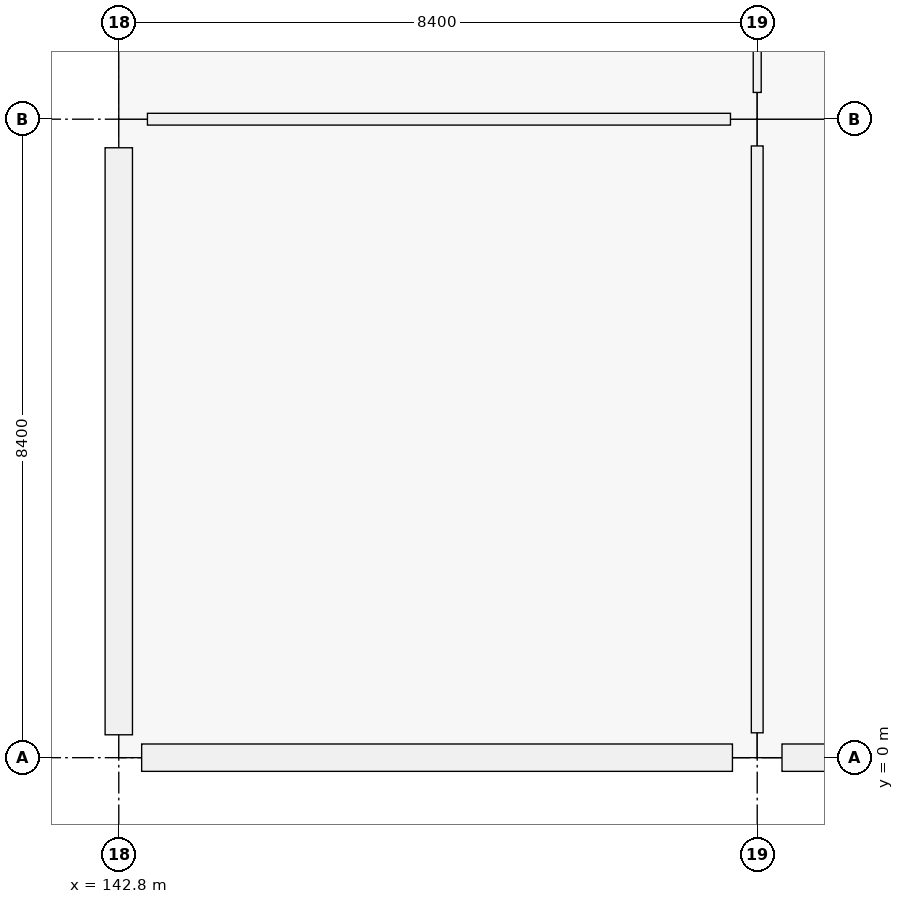
"""IFC4 building model, lengths in metres.
Left out: names, types, materials, properties, quantities, classifications, styles, units other than length and angle.
Written with IfcOpenShell. Run it as: python <this file> out.ifc"""

import sys

from ifc_helpers import new_model, si_unit, direction, frame, frame_2d, origin, origin_2d, place, context, subcontext, project, spatial, rectangle, extrude, element, fill, save


model = new_model("IFC4")
c1 = context("Model", 3, precision=1e-05, world=origin(), true_north=direction((0.0, 1.0)))
c2 = subcontext(c1, "Body", "Model", "MODEL_VIEW")
j1 = project(units=[si_unit("LENGTHUNIT", "METRE"), si_unit("PLANEANGLEUNIT", "RADIAN")], contexts=[c1])
p1 = place(None, origin())
s1 = spatial("IfcSite", under=j1, at=p1, CompositionType="ELEMENT")
p2 = place(p1, origin())
s2 = spatial("IfcBuilding", under=s1, at=p2, CompositionType="ELEMENT")
p3 = place(p2, origin())
s3 = spatial("IfcBuildingStorey", under=s2, at=p3, CompositionType="ELEMENT", Elevation=0.0)
p4 = place(p3, frame((142.8, 0.0, 0.0), z_axis=(0.0, 0.0, 1.0), x_axis=(1.0, 0.0, 0.0)))
e1 = element("IfcColumn", 1, at=p4, inside=s3, PredefinedType="COLUMN", context=c2, shape_type="SweptSolid", body=[
    extrude(rectangle(XDim=0.6, YDim=0.6, at=origin_2d()), origin(), (0.0, 0.0, 1.0), 5.76),
])
p5 = place(p3, frame((142.8, 8.4, 0.0), z_axis=(0.0, 0.0, 1.0), x_axis=(1.0, 0.0, 0.0)))
e2 = element("IfcColumn", 2, at=p5, inside=s3, PredefinedType="COLUMN", context=c2, shape_type="SweptSolid", body=[
    extrude(rectangle(XDim=0.75, YDim=0.75, at=origin_2d()), origin(), (0.0, 0.0, 1.0), 5.76),
])
p6 = place(p3, frame((151.2, 0.0, 0.0), z_axis=(0.0, 0.0, 1.0), x_axis=(1.0, 0.0, 0.0)))
e3 = element("IfcColumn", 3, at=p6, inside=s3, PredefinedType="COLUMN", context=c2, shape_type="SweptSolid", body=[
    extrude(rectangle(XDim=0.65, YDim=0.65, at=origin_2d()), origin(), (0.0, 0.0, 1.0), 5.76),
])
p7 = place(p3, frame((151.2, 8.4, 0.0), z_axis=(0.0, 0.0, 1.0), x_axis=(1.0, 0.0, 0.0)))
e4 = element("IfcColumn", 4, at=p7, inside=s3, PredefinedType="COLUMN", context=c2, shape_type="SweptSolid", body=[
    extrude(rectangle(XDim=0.7, YDim=0.7, at=origin_2d()), origin(), (0.0, 0.0, 1.0), 5.76),
])
p8 = place(p3, frame((150.874, 0.0, 0.0), z_axis=(0.0, 0.0, 1.0), x_axis=(-1.0, 0.0, 0.0)))
e5 = element("IfcWall", 5, at=p8, inside=s3, PredefinedType="SOLIDWALL", context=c2, shape_type="SweptSolid", body=[
    extrude(rectangle(XDim=7.773, YDim=0.36, at=frame_2d((3.886, 0.0))), origin(), (0.0, 0.0, 1.0), 4.7),
])
p9 = place(p8, frame((2.712, 0.0, 0.9)))
e6 = element("IfcOpeningElement", 6, at=p9, cuts=e5, PredefinedType="OPENING", context=c2, shape_type="SweptSolid", body=[
    extrude(rectangle(XDim=2.35, YDim=1.6, at=frame_2d((1.175, 0.8))), frame((0.0, 0.18, 0.0), z_axis=(0.0, -1.0, 0.0), x_axis=(1.0, 0.0, 0.0)), (0.0, 0.0, 1.0), 0.36),
])
p10 = place(p3, frame((142.8, 0.301, 0.0), z_axis=(0.0, 0.0, 1.0), x_axis=(0.0, 1.0, 0.0)))
e7 = element("IfcWall", 7, at=p10, inside=s3, PredefinedType="SOLIDWALL", context=c2, shape_type="SweptSolid", body=[
    extrude(rectangle(XDim=7.723, YDim=0.36, at=frame_2d((3.861, 0.0))), origin(), (0.0, 0.0, 1.0), 4.7),
])
p11 = place(p10, frame((2.486, 0.0, 0.9)))
e8 = element("IfcOpeningElement", 8, at=p11, cuts=e7, PredefinedType="OPENING", context=c2, shape_type="SweptSolid", body=[
    extrude(rectangle(XDim=2.75, YDim=1.6, at=frame_2d((1.375, 0.8))), frame((0.0, 0.18, 0.0), z_axis=(0.0, -1.0, 0.0), x_axis=(1.0, 0.0, 0.0)), (0.0, 0.0, 1.0), 0.36),
])
p12 = place(p3, frame((159.299, 0.0, 0.0), z_axis=(0.0, 0.0, 1.0), x_axis=(-1.0, 0.0, 0.0)))
e9 = element("IfcWall", 9, at=p12, inside=s3, PredefinedType="SOLIDWALL", context=c2, shape_type="SweptSolid", body=[
    extrude(rectangle(XDim=7.773, YDim=0.36, at=frame_2d((3.887, 0.0))), origin(), (0.0, 0.0, 1.0), 4.7),
])
p13 = place(p12, frame((2.736, 0.0, 0.0)))
e10 = element("IfcOpeningElement", 10, at=p13, cuts=e9, PredefinedType="OPENING", context=c2, shape_type="SweptSolid", body=[
    extrude(rectangle(XDim=2.3, YDim=2.3, at=frame_2d((1.15, 1.15))), frame((0.0, 0.18, 0.0), z_axis=(0.0, -1.0, 0.0), x_axis=(1.0, 0.0, 0.0)), (0.0, 0.0, 1.0), 0.36),
])
p14 = place(p3, frame((143.177, 8.4, 0.0), z_axis=(0.0, 0.0, 1.0), x_axis=(1.0, 0.0, 0.0)))
e11 = element("IfcWall", 11, at=p14, inside=s3, PredefinedType="PARTITIONING", context=c2, shape_type="SweptSolid", body=[
    extrude(rectangle(XDim=7.671, YDim=0.155, at=frame_2d((3.835, 0.0))), origin(), (0.0, 0.0, 1.0), 3.66),
])
p15 = place(p14, frame((3.331, 0.0, 0.0)))
e12 = element("IfcOpeningElement", 12, at=p15, cuts=e11, PredefinedType="OPENING", context=c2, shape_type="SweptSolid", body=[
    extrude(rectangle(XDim=1.01, YDim=2.12, at=frame_2d((0.505, 1.06))), frame((0.0, 0.078, 0.0), z_axis=(0.0, -1.0, 0.0), x_axis=(1.0, 0.0, 0.0)), (0.0, 0.0, 1.0), 0.155),
])
p16 = place(p3, frame((151.2, 0.327, 0.0), z_axis=(0.0, 0.0, 1.0), x_axis=(0.0, 1.0, 0.0)))
e13 = element("IfcWall", 13, at=p16, inside=s3, PredefinedType="PARTITIONING", context=c2, shape_type="SweptSolid", body=[
    extrude(rectangle(XDim=7.721, YDim=0.155, at=frame_2d((3.861, 0.0))), origin(), (0.0, 0.0, 1.0), 3.66),
])
p17 = place(p16, frame((3.376, 0.0, 0.0)))
e14 = element("IfcOpeningElement", 14, at=p17, cuts=e13, PredefinedType="OPENING", context=c2, shape_type="SweptSolid", body=[
    extrude(rectangle(XDim=0.97, YDim=2.12, at=frame_2d((0.485, 1.06))), frame((0.0, 0.078, 0.0), z_axis=(0.0, -1.0, 0.0), x_axis=(1.0, 0.0, 0.0)), (0.0, 0.0, 1.0), 0.155),
])
p18 = place(p3, frame((151.2, 8.752, 0.0), z_axis=(0.0, 0.0, 1.0), x_axis=(0.0, 1.0, 0.0)))
e15 = element("IfcWall", 15, at=p18, inside=s3, PredefinedType="PARTITIONING", context=c2, shape_type="SweptSolid", body=[
    extrude(rectangle(XDim=7.646, YDim=0.105, at=frame_2d((3.823, 0.0))), origin(), (0.0, 0.0, 1.0), 3.66),
])
p19 = place(p18, frame((3.358, 0.0, 0.0)))
e16 = element("IfcOpeningElement", 16, at=p19, cuts=e15, PredefinedType="OPENING", context=c2, shape_type="SweptSolid", body=[
    extrude(rectangle(XDim=0.93, YDim=2.12, at=frame_2d((0.465, 1.06))), frame((0.0, 0.052, 0.0), z_axis=(0.0, -1.0, 0.0), x_axis=(1.0, 0.0, 0.0)), (0.0, 0.0, 1.0), 0.105),
])
p20 = place(p9, origin())
e17 = element("IfcWindow", 17, at=p20, inside=s3, PartitioningType="SINGLE_PANEL", PredefinedType="WINDOW", context=c2, shape_type="SweptSolid", body=[
    extrude(rectangle(XDim=2.35, YDim=1.6, at=frame_2d((1.175, 0.8))), frame((0.0, 0.03, 0.0), z_axis=(0.0, -1.0, 0.0), x_axis=(1.0, 0.0, 0.0)), (0.0, 0.0, 1.0), 0.06),
])
fill(e6, e17)
p21 = place(p11, origin())
e18 = element("IfcWindow", 18, at=p21, inside=s3, PartitioningType="SINGLE_PANEL", PredefinedType="WINDOW", context=c2, shape_type="SweptSolid", body=[
    extrude(rectangle(XDim=2.75, YDim=1.6, at=frame_2d((1.375, 0.8))), frame((0.0, 0.03, 0.0), z_axis=(0.0, -1.0, 0.0), x_axis=(1.0, 0.0, 0.0)), (0.0, 0.0, 1.0), 0.06),
])
fill(e8, e18)
p22 = place(p15, origin())
e19 = element("IfcDoor", 19, at=p22, inside=s3, OperationType="SINGLE_SWING_RIGHT", PredefinedType="DOOR", context=c2, shape_type="SweptSolid", body=[
    extrude(rectangle(XDim=1.01, YDim=2.12, at=frame_2d((0.505, 1.06))), frame((0.0, 0.025, 0.0), z_axis=(0.0, -1.0, 0.0), x_axis=(1.0, 0.0, 0.0)), (0.0, 0.0, 1.0), 0.05),
])
fill(e12, e19)
p23 = place(p17, origin())
e20 = element("IfcDoor", 20, at=p23, inside=s3, OperationType="SINGLE_SWING_RIGHT", PredefinedType="DOOR", context=c2, shape_type="SweptSolid", body=[
    extrude(rectangle(XDim=0.97, YDim=2.12, at=frame_2d((0.485, 1.06))), frame((0.0, 0.025, 0.0), z_axis=(0.0, -1.0, 0.0), x_axis=(1.0, 0.0, 0.0)), (0.0, 0.0, 1.0), 0.05),
])
fill(e14, e20)
save(model, sys.argv[1])
